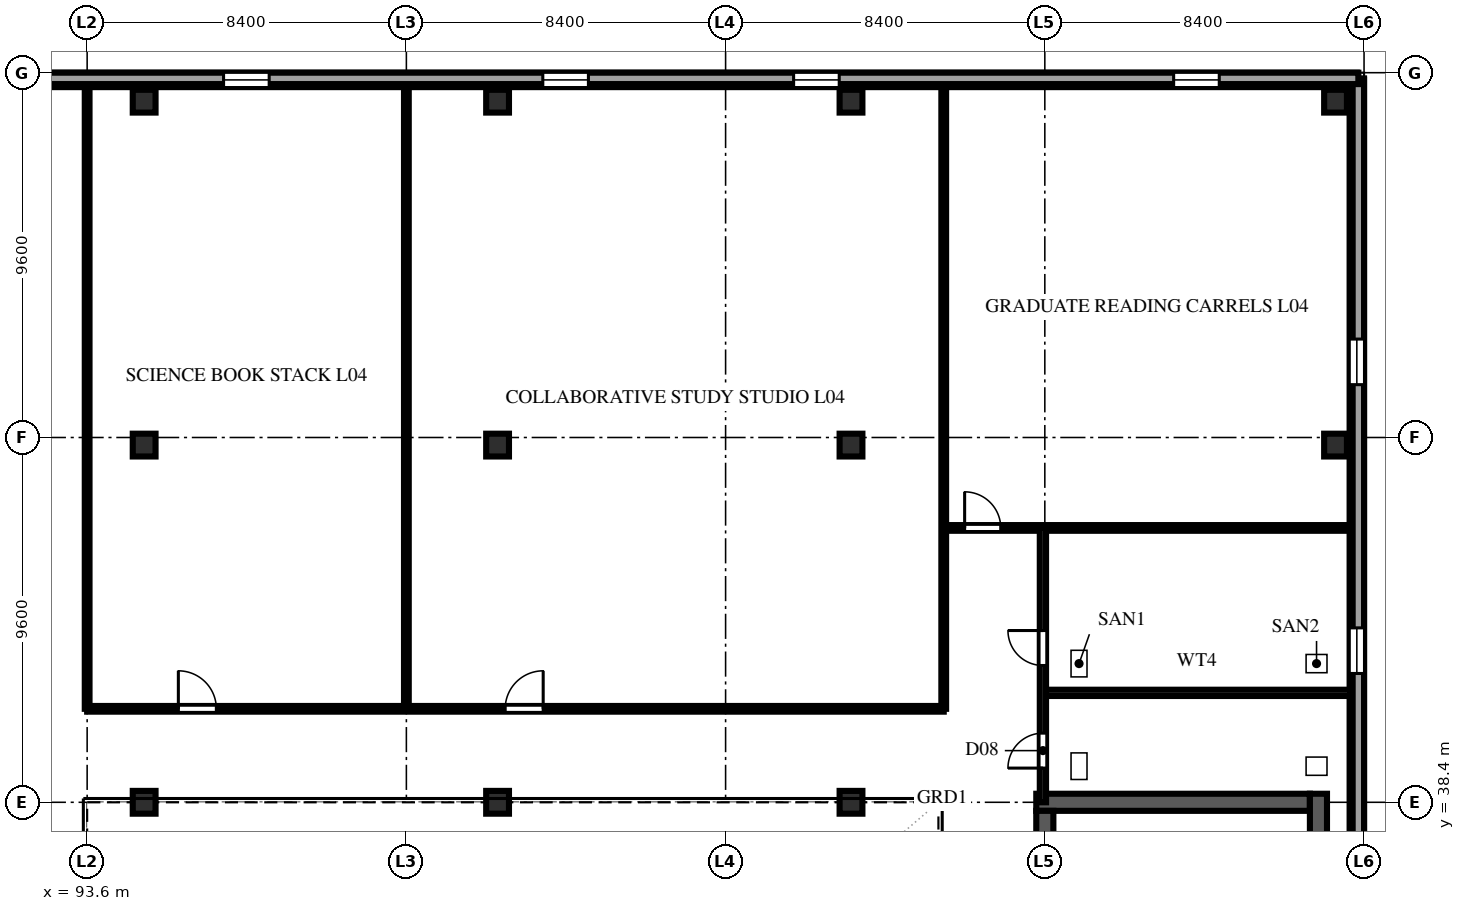
"""IFC4 building model, lengths in metres.
Left out: names, types, materials, properties, quantities, classifications, styles, units other than length and angle.
Written with IfcOpenShell. Run it as: python <this file> out.ifc"""

import sys

from ifc_helpers import new_model, si_unit, direction, frame, frame_2d, origin, origin_2d, place, context, subcontext, project, spatial, rectangle, extrude, element, fill, save


model = new_model("IFC4")
c1 = context("Model", 3, precision=1e-05, world=origin(), true_north=direction((0.0, 1.0)))
c2 = subcontext(c1, "Body", "Model", "MODEL_VIEW")
j1 = project(units=[si_unit("LENGTHUNIT", "METRE"), si_unit("PLANEANGLEUNIT", "RADIAN")], contexts=[c1])
p1 = place(None, origin())
s1 = spatial("IfcSite", under=j1, at=p1, CompositionType="ELEMENT")
p2 = place(p1, origin())
s2 = spatial("IfcBuilding", under=s1, at=p2, CompositionType="ELEMENT")
p3 = place(p2, frame((0.0, 0.0, 19.6)))
s3 = spatial("IfcBuildingStorey", under=s2, at=p3, CompositionType="ELEMENT", Elevation=19.6)
p4 = place(p3, frame((118.575, 38.4, 0.0), z_axis=(0.0, 0.0, 1.0), x_axis=(1.0, 0.0, 0.0)))
e1 = element("IfcWall", 1, at=p4, inside=s3, PredefinedType="SHEAR", context=c2, shape_type="SweptSolid", body=[
    extrude(rectangle(XDim=7.2, YDim=0.45, at=frame_2d((3.6, 0.0))), origin(), (0.0, 0.0, 1.0), 4.32),
])
p5 = place(p3, frame((126.0, 18.975, 0.0), z_axis=(0.0, 0.0, 1.0), x_axis=(0.0, 1.0, 0.0)))
e2 = element("IfcWall", 2, at=p5, inside=s3, PredefinedType="SHEAR", context=c2, shape_type="SweptSolid", body=[
    extrude(rectangle(XDim=19.65, YDim=0.45, at=frame_2d((9.825, 0.0))), origin(), (0.0, 0.0, 1.0), 4.32),
])
p6 = place(p3, frame((118.8, 34.4, 0.0), z_axis=(0.0, 0.0, 1.0), x_axis=(0.0, 1.0, 0.0)))
e3 = element("IfcWall", 3, at=p6, inside=s3, PredefinedType="SHEAR", context=c2, shape_type="SweptSolid", body=[
    extrude(rectangle(XDim=3.775, YDim=0.45, at=frame_2d((1.888, 0.0))), origin(), (0.0, 0.0, 1.0), 4.32),
])
for number, where, z_axis, x_axis in (
    (4, (95.1, 38.4, 0.0), (0.0, 0.0, 1.0), (1.0, 0.0, 0.0)),
    (5, (95.1, 47.8, 0.0), (0.0, 0.0, 1.0), (1.0, 0.0, 0.0)),
    (6, (95.1, 56.85, 0.0), (0.0, 0.0, 1.0), (1.0, 0.0, 0.0)),
    (7, (104.4, 38.4, 0.0), (0.0, 0.0, 1.0), (1.0, 0.0, 0.0)),
    (8, (104.4, 47.8, 0.0), (0.0, 0.0, 1.0), (1.0, 0.0, 0.0)),
    (9, (104.4, 56.85, 0.0), (0.0, 0.0, 1.0), (1.0, 0.0, 0.0)),
    (10, (113.7, 38.4, 0.0), (0.0, 0.0, 1.0), (1.0, 0.0, 0.0)),
    (11, (113.7, 47.8, 0.0), (0.0, 0.0, 1.0), (1.0, 0.0, 0.0)),
    (12, (113.7, 56.85, 0.0), (0.0, 0.0, 1.0), (1.0, 0.0, 0.0)),
    (13, (126.45, 47.8, 0.0), (0.0, 0.0, 1.0), (1.0, 0.0, 0.0)),
    (14, (126.45, 56.85, 0.0), (0.0, 0.0, 1.0), (1.0, 0.0, 0.0)),
):
    element("IfcColumn", number, at=place(p3, frame(where, z_axis=z_axis, x_axis=x_axis)), inside=s3, PredefinedType="COLUMN", context=c2, shape_type="SweptSolid", body=[
        extrude(rectangle(XDim=0.6, YDim=0.6, at=origin_2d()), origin(), (0.0, 0.0, 1.0), 4.32),
    ])
p7 = place(p3, frame((85.39, 57.41, 0.0), z_axis=(0.0, 0.0, 1.0), x_axis=(1.0, 0.0, 0.0)))
e15 = element("IfcWall", 15, at=p7, inside=s3, PredefinedType="SOLIDWALL", context=c2, shape_type="SweptSolid", body=[
    extrude(rectangle(XDim=41.62, YDim=0.38, at=frame_2d((20.81, 0.0))), origin(), (0.0, 0.0, 1.0), 4.32),
])
p8 = place(p7, frame((5.0, 0.0, 1.25)))
e16 = element("IfcOpeningElement", 16, at=p8, cuts=e15, PredefinedType="OPENING", context=c2, shape_type="SweptSolid", body=[
    extrude(rectangle(XDim=1.2, YDim=1.65, at=frame_2d((0.6, 0.825))), frame((0.0, 0.202, 0.0), z_axis=(0.0, -1.0, 0.0), x_axis=(1.0, 0.0, 0.0)), (0.0, 0.0, 1.0), 0.404),
])
p9 = place(p7, frame((11.8, 0.0, 1.25)))
e17 = element("IfcOpeningElement", 17, at=p9, cuts=e15, PredefinedType="OPENING", context=c2, shape_type="SweptSolid", body=[
    extrude(rectangle(XDim=1.2, YDim=1.65, at=frame_2d((0.6, 0.825))), frame((0.0, 0.202, 0.0), z_axis=(0.0, -1.0, 0.0), x_axis=(1.0, 0.0, 0.0)), (0.0, 0.0, 1.0), 0.404),
])
p10 = place(p7, frame((20.2, 0.0, 1.25)))
e18 = element("IfcOpeningElement", 18, at=p10, cuts=e15, PredefinedType="OPENING", context=c2, shape_type="SweptSolid", body=[
    extrude(rectangle(XDim=1.2, YDim=1.65, at=frame_2d((0.6, 0.825))), frame((0.0, 0.202, 0.0), z_axis=(0.0, -1.0, 0.0), x_axis=(1.0, 0.0, 0.0)), (0.0, 0.0, 1.0), 0.404),
])
p11 = place(p7, frame((26.8, 0.0, 1.25)))
e19 = element("IfcOpeningElement", 19, at=p11, cuts=e15, PredefinedType="OPENING", context=c2, shape_type="SweptSolid", body=[
    extrude(rectangle(XDim=1.2, YDim=1.65, at=frame_2d((0.6, 0.825))), frame((0.0, 0.202, 0.0), z_axis=(0.0, -1.0, 0.0), x_axis=(1.0, 0.0, 0.0)), (0.0, 0.0, 1.0), 0.404),
])
p12 = place(p7, frame((36.8, 0.0, 1.25)))
e20 = element("IfcOpeningElement", 20, at=p12, cuts=e15, PredefinedType="OPENING", context=c2, shape_type="SweptSolid", body=[
    extrude(rectangle(XDim=1.2, YDim=1.65, at=frame_2d((0.6, 0.825))), frame((0.0, 0.202, 0.0), z_axis=(0.0, -1.0, 0.0), x_axis=(1.0, 0.0, 0.0)), (0.0, 0.0, 1.0), 0.404),
])
p13 = place(p3, frame((127.01, 0.19, 0.0), z_axis=(0.0, 0.0, 1.0), x_axis=(0.0, 1.0, 0.0)))
e21 = element("IfcWall", 21, at=p13, inside=s3, PredefinedType="SOLIDWALL", context=c2, shape_type="SweptSolid", body=[
    extrude(rectangle(XDim=57.22, YDim=0.38, at=frame_2d((28.61, 0.0))), origin(), (0.0, 0.0, 1.0), 4.32),
])
p14 = place(p13, frame((3.6, 0.0, 1.25)))
e22 = element("IfcOpeningElement", 22, at=p14, cuts=e21, PredefinedType="OPENING", context=c2, shape_type="SweptSolid", body=[
    extrude(rectangle(XDim=1.2, YDim=1.65, at=frame_2d((0.6, 0.825))), frame((0.0, 0.202, 0.0), z_axis=(0.0, -1.0, 0.0), x_axis=(1.0, 0.0, 0.0)), (0.0, 0.0, 1.0), 0.404),
])
p15 = place(p13, frame((11.2, 0.0, 1.25)))
e23 = element("IfcOpeningElement", 23, at=p15, cuts=e21, PredefinedType="OPENING", context=c2, shape_type="SweptSolid", body=[
    extrude(rectangle(XDim=1.2, YDim=1.65, at=frame_2d((0.6, 0.825))), frame((0.0, 0.202, 0.0), z_axis=(0.0, -1.0, 0.0), x_axis=(1.0, 0.0, 0.0)), (0.0, 0.0, 1.0), 0.404),
])
p16 = place(p13, frame((41.6, 0.0, 1.25)))
e24 = element("IfcOpeningElement", 24, at=p16, cuts=e21, PredefinedType="OPENING", context=c2, shape_type="SweptSolid", body=[
    extrude(rectangle(XDim=1.2, YDim=1.65, at=frame_2d((0.6, 0.825))), frame((0.0, 0.202, 0.0), z_axis=(0.0, -1.0, 0.0), x_axis=(1.0, 0.0, 0.0)), (0.0, 0.0, 1.0), 0.404),
])
p17 = place(p13, frame((49.2, 0.0, 1.25)))
e25 = element("IfcOpeningElement", 25, at=p17, cuts=e21, PredefinedType="OPENING", context=c2, shape_type="SweptSolid", body=[
    extrude(rectangle(XDim=1.2, YDim=1.65, at=frame_2d((0.6, 0.825))), frame((0.0, 0.202, 0.0), z_axis=(0.0, -1.0, 0.0), x_axis=(1.0, 0.0, 0.0)), (0.0, 0.0, 1.0), 0.404),
])
p18 = place(p3, frame((127.05, 0.15, 4.6), z_axis=(0.0, 0.0, 1.0), x_axis=(0.0, 1.0, 0.0)))
e26 = element("IfcWall", 26, at=p18, inside=s3, PredefinedType="PARAPET", context=c2, shape_type="SweptSolid", body=[
    extrude(rectangle(XDim=57.3, YDim=0.3, at=frame_2d((28.65, 0.0))), origin(), (0.0, 0.0, 1.0), 1.15),
])
p19 = place(p3, frame((127.05, 57.45, 4.6), z_axis=(0.0, 0.0, 1.0), x_axis=(-1.0, 0.0, 0.0)))
e27 = element("IfcWall", 27, at=p19, inside=s3, PredefinedType="PARAPET", context=c2, shape_type="SweptSolid", body=[
    extrude(rectangle(XDim=41.7, YDim=0.3, at=frame_2d((20.85, 0.0))), origin(), (0.0, 0.0, 1.0), 1.15),
])
for number, where, z_axis, x_axis in (
    (28, (93.6, 40.86, 0.0), (0.0, 0.0, 1.0), (0.0, 1.0, 0.0)),
    (29, (102.0, 40.86, 0.0), (0.0, 0.0, 1.0), (0.0, 1.0, 0.0)),
    (30, (116.14, 40.86, 0.0), (0.0, 0.0, 1.0), (0.0, 1.0, 0.0)),
):
    element("IfcWall", number, at=place(p3, frame(where, z_axis=z_axis, x_axis=x_axis)), inside=s3, PredefinedType="PARTITIONING", context=c2, shape_type="SweptSolid", body=[
        extrude(rectangle(XDim=16.39, YDim=0.125, at=frame_2d((8.195, 0.0))), origin(), (0.0, 0.0, 1.0), 4.32),
    ])
p20 = place(p3, frame((93.6, 40.86, 0.0), z_axis=(0.0, 0.0, 1.0), x_axis=(1.0, 0.0, 0.0)))
e31 = element("IfcWall", 31, at=p20, inside=s3, PredefinedType="PARTITIONING", context=c2, shape_type="SweptSolid", body=[
    extrude(rectangle(XDim=22.54, YDim=0.15, at=frame_2d((11.27, 0.0))), origin(), (0.0, 0.0, 1.0), 4.32),
])
p21 = place(p20, frame((2.4, 0.0, 0.0)))
e32 = element("IfcOpeningElement", 32, at=p21, cuts=e31, PredefinedType="OPENING", context=c2, shape_type="SweptSolid", body=[
    extrude(rectangle(XDim=1.0, YDim=2.2, at=frame_2d((0.5, 1.1))), frame((0.0, 0.087, 0.0), z_axis=(0.0, -1.0, 0.0), x_axis=(1.0, 0.0, 0.0)), (0.0, 0.0, 1.0), 0.174),
])
p22 = place(p20, frame((11.0, 0.0, 0.0)))
e33 = element("IfcOpeningElement", 33, at=p22, cuts=e31, PredefinedType="OPENING", context=c2, shape_type="SweptSolid", body=[
    extrude(rectangle(XDim=1.0, YDim=2.2, at=frame_2d((0.5, 1.1))), frame((0.0, 0.087, 0.0), z_axis=(0.0, -1.0, 0.0), x_axis=(1.0, 0.0, 0.0)), (0.0, 0.0, 1.0), 0.174),
])
p23 = place(p3, frame((118.75, 41.28, 0.0), z_axis=(0.0, 0.0, 1.0), x_axis=(1.0, 0.0, 0.0)))
e34 = element("IfcWall", 34, at=p23, inside=s3, PredefinedType="PLUMBINGWALL", context=c2, shape_type="SweptSolid", body=[
    extrude(rectangle(XDim=8.1, YDim=0.165, at=frame_2d((4.05, 0.0))), origin(), (0.0, 0.0, 1.0), 4.32),
])
p24 = place(p3, frame((116.14, 45.62, 0.0), z_axis=(0.0, 0.0, 1.0), x_axis=(1.0, 0.0, 0.0)))
e35 = element("IfcWall", 35, at=p24, inside=s3, PredefinedType="PARTITIONING", context=c2, shape_type="SweptSolid", body=[
    extrude(rectangle(XDim=10.71, YDim=0.15, at=frame_2d((5.355, 0.0))), origin(), (0.0, 0.0, 1.0), 4.32),
])
p25 = place(p24, frame((0.55, 0.0, 0.0)))
e36 = element("IfcOpeningElement", 36, at=p25, cuts=e35, PredefinedType="OPENING", context=c2, shape_type="SweptSolid", body=[
    extrude(rectangle(XDim=0.95, YDim=2.15, at=frame_2d((0.475, 1.075))), frame((0.0, 0.087, 0.0), z_axis=(0.0, -1.0, 0.0), x_axis=(1.0, 0.0, 0.0)), (0.0, 0.0, 1.0), 0.174),
])
p26 = place(p3, frame((118.75, 38.4, 0.0), z_axis=(0.0, 0.0, 1.0), x_axis=(0.0, 1.0, 0.0)))
e37 = element("IfcWall", 37, at=p26, inside=s3, PredefinedType="PLUMBINGWALL", context=c2, shape_type="SweptSolid", body=[
    extrude(rectangle(XDim=7.22, YDim=0.165, at=frame_2d((3.61, 0.0))), origin(), (0.0, 0.0, 1.0), 4.32),
])
p27 = place(p26, frame((0.9, 0.0, 0.0)))
e38 = element("IfcOpeningElement", 38, at=p27, cuts=e37, PredefinedType="OPENING", context=c2, shape_type="SweptSolid", body=[
    extrude(rectangle(XDim=0.92, YDim=2.15, at=frame_2d((0.46, 1.075))), frame((0.0, 0.094, 0.0), z_axis=(0.0, -1.0, 0.0), x_axis=(1.0, 0.0, 0.0)), (0.0, 0.0, 1.0), 0.189),
])
p28 = place(p26, frame((3.6, 0.0, 0.0)))
e39 = element("IfcOpeningElement", 39, at=p28, cuts=e37, PredefinedType="OPENING", context=c2, shape_type="SweptSolid", body=[
    extrude(rectangle(XDim=0.92, YDim=2.15, at=frame_2d((0.46, 1.075))), frame((0.0, 0.094, 0.0), z_axis=(0.0, -1.0, 0.0), x_axis=(1.0, 0.0, 0.0)), (0.0, 0.0, 1.0), 0.189),
])
p29 = place(p9, origin())
e40 = element("IfcWindow", 40, at=p29, inside=s3, PartitioningType="SINGLE_PANEL", PredefinedType="WINDOW", context=c2, shape_type="SweptSolid", body=[
    extrude(rectangle(XDim=1.2, YDim=1.65, at=frame_2d((0.6, 0.825))), frame((0.0, 0.11, 0.0), z_axis=(0.0, -1.0, 0.0), x_axis=(1.0, 0.0, 0.0)), (0.0, 0.0, 1.0), 0.06),
])
fill(e17, e40)
p30 = place(p10, origin())
e41 = element("IfcWindow", 41, at=p30, inside=s3, PartitioningType="SINGLE_PANEL", PredefinedType="WINDOW", context=c2, shape_type="SweptSolid", body=[
    extrude(rectangle(XDim=1.2, YDim=1.65, at=frame_2d((0.6, 0.825))), frame((0.0, 0.11, 0.0), z_axis=(0.0, -1.0, 0.0), x_axis=(1.0, 0.0, 0.0)), (0.0, 0.0, 1.0), 0.06),
])
fill(e18, e41)
p31 = place(p11, origin())
e42 = element("IfcWindow", 42, at=p31, inside=s3, PartitioningType="SINGLE_PANEL", PredefinedType="WINDOW", context=c2, shape_type="SweptSolid", body=[
    extrude(rectangle(XDim=1.2, YDim=1.65, at=frame_2d((0.6, 0.825))), frame((0.0, 0.11, 0.0), z_axis=(0.0, -1.0, 0.0), x_axis=(1.0, 0.0, 0.0)), (0.0, 0.0, 1.0), 0.06),
])
fill(e19, e42)
p32 = place(p12, origin())
e43 = element("IfcWindow", 43, at=p32, inside=s3, PartitioningType="SINGLE_PANEL", PredefinedType="WINDOW", context=c2, shape_type="SweptSolid", body=[
    extrude(rectangle(XDim=1.2, YDim=1.65, at=frame_2d((0.6, 0.825))), frame((0.0, 0.11, 0.0), z_axis=(0.0, -1.0, 0.0), x_axis=(1.0, 0.0, 0.0)), (0.0, 0.0, 1.0), 0.06),
])
fill(e20, e43)
p33 = place(p16, origin())
e44 = element("IfcWindow", 44, at=p33, inside=s3, PartitioningType="SINGLE_PANEL", PredefinedType="WINDOW", context=c2, shape_type="SweptSolid", body=[
    extrude(rectangle(XDim=1.2, YDim=1.65, at=frame_2d((0.6, 0.825))), frame((0.0, 0.11, 0.0), z_axis=(0.0, -1.0, 0.0), x_axis=(1.0, 0.0, 0.0)), (0.0, 0.0, 1.0), 0.06),
])
fill(e24, e44)
p34 = place(p17, origin())
e45 = element("IfcWindow", 45, at=p34, inside=s3, PartitioningType="SINGLE_PANEL", PredefinedType="WINDOW", context=c2, shape_type="SweptSolid", body=[
    extrude(rectangle(XDim=1.2, YDim=1.65, at=frame_2d((0.6, 0.825))), frame((0.0, 0.11, 0.0), z_axis=(0.0, -1.0, 0.0), x_axis=(1.0, 0.0, 0.0)), (0.0, 0.0, 1.0), 0.06),
])
fill(e25, e45)
p35 = place(p21, origin())
e46 = element("IfcDoor", 46, at=p35, inside=s3, OperationType="SINGLE_SWING_LEFT", PredefinedType="DOOR", context=c2, shape_type="SweptSolid", body=[
    extrude(rectangle(XDim=1.0, YDim=2.2, at=frame_2d((0.5, 1.1))), frame((0.0, 0.025, 0.0), z_axis=(0.0, -1.0, 0.0), x_axis=(1.0, 0.0, 0.0)), (0.0, 0.0, 1.0), 0.05),
])
fill(e32, e46)
p36 = place(p22, origin())
e47 = element("IfcDoor", 47, at=p36, inside=s3, OperationType="SINGLE_SWING_RIGHT", PredefinedType="DOOR", context=c2, shape_type="SweptSolid", body=[
    extrude(rectangle(XDim=1.0, YDim=2.2, at=frame_2d((0.5, 1.1))), frame((0.0, 0.025, 0.0), z_axis=(0.0, -1.0, 0.0), x_axis=(1.0, 0.0, 0.0)), (0.0, 0.0, 1.0), 0.05),
])
fill(e33, e47)
p37 = place(p25, origin())
e48 = element("IfcDoor", 48, at=p37, inside=s3, OperationType="SINGLE_SWING_LEFT", PredefinedType="DOOR", context=c2, shape_type="SweptSolid", body=[
    extrude(rectangle(XDim=0.95, YDim=2.15, at=frame_2d((0.475, 1.075))), frame((0.0, 0.025, 0.0), z_axis=(0.0, -1.0, 0.0), x_axis=(1.0, 0.0, 0.0)), (0.0, 0.0, 1.0), 0.05),
])
fill(e36, e48)
p38 = place(p27, origin())
e49 = element("IfcDoor", 49, at=p38, inside=s3, OperationType="SINGLE_SWING_LEFT", PredefinedType="DOOR", context=c2, shape_type="SweptSolid", body=[
    extrude(rectangle(XDim=0.92, YDim=2.15, at=frame_2d((0.46, 1.075))), frame((0.0, 0.025, 0.0), z_axis=(0.0, -1.0, 0.0), x_axis=(1.0, 0.0, 0.0)), (0.0, 0.0, 1.0), 0.05),
])
fill(e38, e49)
p39 = place(p28, origin())
e50 = element("IfcDoor", 50, at=p39, inside=s3, OperationType="SINGLE_SWING_RIGHT", PredefinedType="DOOR", context=c2, shape_type="SweptSolid", body=[
    extrude(rectangle(XDim=0.92, YDim=2.15, at=frame_2d((0.46, 1.075))), frame((0.0, 0.025, 0.0), z_axis=(0.0, -1.0, 0.0), x_axis=(1.0, 0.0, 0.0)), (0.0, 0.0, 1.0), 0.05),
])
fill(e39, e50)
save(model, sys.argv[1])
